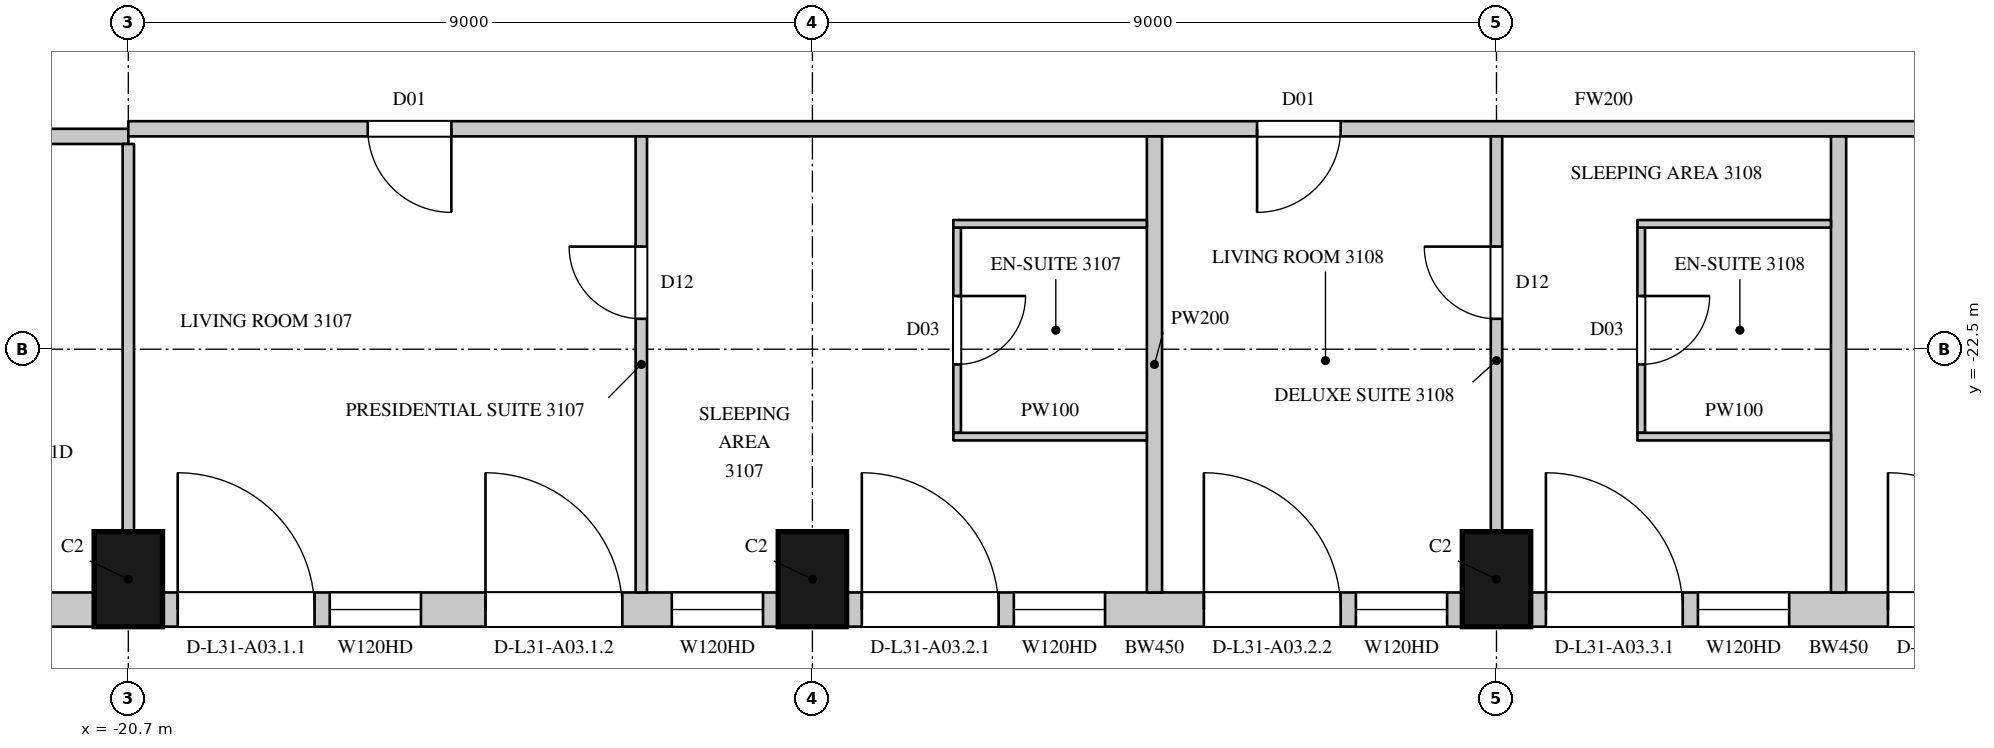
"""IFC4 building model, lengths in metres.
Left out: names, types, materials, properties, quantities, classifications, styles, units other than length and angle.
Written with IfcOpenShell. Run it as: python <this file> out.ifc"""

import sys

from ifc_helpers import new_model, si_unit, direction, frame, frame_2d, origin, origin_2d, place, context, subcontext, project, spatial, rectangle, extrude, element, fill, save


model = new_model("IFC4")
c1 = context("Model", 3, precision=1e-05, world=origin(), true_north=direction((0.0, 1.0)))
c2 = subcontext(c1, "Body", "Model", "MODEL_VIEW")
j1 = project(units=[si_unit("LENGTHUNIT", "METRE"), si_unit("PLANEANGLEUNIT", "RADIAN")], contexts=[c1])
p1 = place(None, origin())
s1 = spatial("IfcSite", under=j1, at=p1, CompositionType="ELEMENT")
p2 = place(p1, origin())
s2 = spatial("IfcBuilding", under=s1, at=p2, CompositionType="ELEMENT")
p3 = place(p2, frame((0.0, 0.0, 141.9)))
s3 = spatial("IfcBuildingStorey", under=s2, at=p3, CompositionType="ELEMENT", Elevation=141.9)
for number, where, z_axis, x_axis in (
    (1, (-20.7, -25.525, 0.0), (0.0, 0.0, 1.0), (1.0, 0.0, 0.0)),
    (2, (-11.7, -25.525, 0.0), (0.0, 0.0, 1.0), (1.0, 0.0, 0.0)),
    (3, (-2.7, -25.525, 0.0), (0.0, 0.0, 1.0), (1.0, 0.0, 0.0)),
):
    element("IfcColumn", number, at=place(p3, frame(where, z_axis=z_axis, x_axis=x_axis)), inside=s3, PredefinedType="COLUMN", context=c2, shape_type="SweptSolid", body=[
        extrude(rectangle(XDim=0.9, YDim=1.25, at=origin_2d()), origin(), (0.0, 0.0, 1.0), 3.6),
    ])
p4 = place(p3, frame((-24.064, -25.925, 0.0), z_axis=(0.0, 0.0, 1.0), x_axis=(1.0, 0.0, 0.0)))
e4 = element("IfcWall", 4, at=p4, inside=s3, PredefinedType="SOLIDWALL", context=c2, shape_type="SweptSolid", body=[
    extrude(rectangle(XDim=2.914, YDim=0.45, at=frame_2d((1.457, 0.0))), origin(), (0.0, 0.0, 1.0), 3.3),
])
p5 = place(p3, frame((-20.25, -25.925, 0.0), z_axis=(0.0, 0.0, 1.0), x_axis=(1.0, 0.0, 0.0)))
e5 = element("IfcWall", 5, at=p5, inside=s3, PredefinedType="SOLIDWALL", context=c2, shape_type="SweptSolid", body=[
    extrude(rectangle(XDim=8.1, YDim=0.45, at=frame_2d((4.05, 0.0))), origin(), (0.0, 0.0, 1.0), 3.3),
])
p6 = place(p5, frame((0.2, 0.0, 0.0)))
e6 = element("IfcOpeningElement", 6, at=p6, cuts=e5, PredefinedType="OPENING", context=c2, shape_type="SweptSolid", body=[
    extrude(rectangle(XDim=1.8, YDim=2.4, at=frame_2d((0.9, 1.2))), frame((0.0, 0.235, 0.0), z_axis=(0.0, -1.0, 0.0), x_axis=(1.0, 0.0, 0.0)), (0.0, 0.0, 1.0), 0.47),
])
p7 = place(p5, frame((2.2, 0.0, 1.05)))
e7 = element("IfcOpeningElement", 7, at=p7, cuts=e5, PredefinedType="OPENING", context=c2, shape_type="SweptSolid", body=[
    extrude(rectangle(XDim=1.2, YDim=2.0, at=frame_2d((0.6, 1.0))), frame((0.0, 0.235, 0.0), z_axis=(0.0, -1.0, 0.0), x_axis=(1.0, 0.0, 0.0)), (0.0, 0.0, 1.0), 0.47),
])
p8 = place(p5, frame((4.249, 0.0, 0.0)))
e8 = element("IfcOpeningElement", 8, at=p8, cuts=e5, PredefinedType="OPENING", context=c2, shape_type="SweptSolid", body=[
    extrude(rectangle(XDim=1.8, YDim=2.4, at=frame_2d((0.9, 1.2))), frame((0.0, 0.235, 0.0), z_axis=(0.0, -1.0, 0.0), x_axis=(1.0, 0.0, 0.0)), (0.0, 0.0, 1.0), 0.47),
])
p9 = place(p5, frame((6.7, 0.0, 1.05)))
e9 = element("IfcOpeningElement", 9, at=p9, cuts=e5, PredefinedType="OPENING", context=c2, shape_type="SweptSolid", body=[
    extrude(rectangle(XDim=1.2, YDim=2.0, at=frame_2d((0.6, 1.0))), frame((0.0, 0.235, 0.0), z_axis=(0.0, -1.0, 0.0), x_axis=(1.0, 0.0, 0.0)), (0.0, 0.0, 1.0), 0.47),
])
p10 = place(p3, frame((-11.25, -25.925, 0.0), z_axis=(0.0, 0.0, 1.0), x_axis=(1.0, 0.0, 0.0)))
e10 = element("IfcWall", 10, at=p10, inside=s3, PredefinedType="SOLIDWALL", context=c2, shape_type="SweptSolid", body=[
    extrude(rectangle(XDim=8.1, YDim=0.45, at=frame_2d((4.05, 0.0))), origin(), (0.0, 0.0, 1.0), 3.3),
])
p11 = place(p10, frame((0.2, 0.0, 0.0)))
e11 = element("IfcOpeningElement", 11, at=p11, cuts=e10, PredefinedType="OPENING", context=c2, shape_type="SweptSolid", body=[
    extrude(rectangle(XDim=1.8, YDim=2.4, at=frame_2d((0.9, 1.2))), frame((0.0, 0.235, 0.0), z_axis=(0.0, -1.0, 0.0), x_axis=(1.0, 0.0, 0.0)), (0.0, 0.0, 1.0), 0.47),
])
p12 = place(p10, frame((2.2, 0.0, 1.05)))
e12 = element("IfcOpeningElement", 12, at=p12, cuts=e10, PredefinedType="OPENING", context=c2, shape_type="SweptSolid", body=[
    extrude(rectangle(XDim=1.2, YDim=2.0, at=frame_2d((0.6, 1.0))), frame((0.0, 0.235, 0.0), z_axis=(0.0, -1.0, 0.0), x_axis=(1.0, 0.0, 0.0)), (0.0, 0.0, 1.0), 0.47),
])
p13 = place(p10, frame((4.7, 0.0, 0.0)))
e13 = element("IfcOpeningElement", 13, at=p13, cuts=e10, PredefinedType="OPENING", context=c2, shape_type="SweptSolid", body=[
    extrude(rectangle(XDim=1.8, YDim=2.4, at=frame_2d((0.9, 1.2))), frame((0.0, 0.235, 0.0), z_axis=(0.0, -1.0, 0.0), x_axis=(1.0, 0.0, 0.0)), (0.0, 0.0, 1.0), 0.47),
])
p14 = place(p10, frame((6.7, 0.0, 1.05)))
e14 = element("IfcOpeningElement", 14, at=p14, cuts=e10, PredefinedType="OPENING", context=c2, shape_type="SweptSolid", body=[
    extrude(rectangle(XDim=1.2, YDim=2.0, at=frame_2d((0.6, 1.0))), frame((0.0, 0.235, 0.0), z_axis=(0.0, -1.0, 0.0), x_axis=(1.0, 0.0, 0.0)), (0.0, 0.0, 1.0), 0.47),
])
p15 = place(p3, frame((-2.25, -25.925, 0.0), z_axis=(0.0, 0.0, 1.0), x_axis=(1.0, 0.0, 0.0)))
e15 = element("IfcWall", 15, at=p15, inside=s3, PredefinedType="SOLIDWALL", context=c2, shape_type="SweptSolid", body=[
    extrude(rectangle(XDim=8.1, YDim=0.45, at=frame_2d((4.05, 0.0))), origin(), (0.0, 0.0, 1.0), 3.3),
])
p16 = place(p15, frame((0.2, 0.0, 0.0)))
e16 = element("IfcOpeningElement", 16, at=p16, cuts=e15, PredefinedType="OPENING", context=c2, shape_type="SweptSolid", body=[
    extrude(rectangle(XDim=1.8, YDim=2.4, at=frame_2d((0.9, 1.2))), frame((0.0, 0.235, 0.0), z_axis=(0.0, -1.0, 0.0), x_axis=(1.0, 0.0, 0.0)), (0.0, 0.0, 1.0), 0.47),
])
p17 = place(p15, frame((2.2, 0.0, 1.05)))
e17 = element("IfcOpeningElement", 17, at=p17, cuts=e15, PredefinedType="OPENING", context=c2, shape_type="SweptSolid", body=[
    extrude(rectangle(XDim=1.2, YDim=2.0, at=frame_2d((0.6, 1.0))), frame((0.0, 0.235, 0.0), z_axis=(0.0, -1.0, 0.0), x_axis=(1.0, 0.0, 0.0)), (0.0, 0.0, 1.0), 0.47),
])
p18 = place(p15, frame((4.7, 0.0, 0.0)))
e18 = element("IfcOpeningElement", 18, at=p18, cuts=e15, PredefinedType="OPENING", context=c2, shape_type="SweptSolid", body=[
    extrude(rectangle(XDim=1.8, YDim=2.4, at=frame_2d((0.9, 1.2))), frame((0.0, 0.235, 0.0), z_axis=(0.0, -1.0, 0.0), x_axis=(1.0, 0.0, 0.0)), (0.0, 0.0, 1.0), 0.47),
])
p19 = place(p15, frame((6.7, 0.0, 1.05)))
e19 = element("IfcOpeningElement", 19, at=p19, cuts=e15, PredefinedType="OPENING", context=c2, shape_type="SweptSolid", body=[
    extrude(rectangle(XDim=1.2, YDim=2.0, at=frame_2d((0.6, 1.0))), frame((0.0, 0.235, 0.0), z_axis=(0.0, -1.0, 0.0), x_axis=(1.0, 0.0, 0.0)), (0.0, 0.0, 1.0), 0.47),
])
p20 = place(p3, frame((-23.752, -19.7, 0.0), z_axis=(0.0, 0.0, 1.0), x_axis=(1.0, 0.0, 0.0)))
e20 = element("IfcWall", 20, at=p20, inside=s3, PredefinedType="PARTITIONING", context=c2, shape_type="SweptSolid", body=[
    extrude(rectangle(XDim=3.052, YDim=0.2, at=frame_2d((1.526, 0.0))), origin(), (0.0, 0.0, 1.0), 3.3),
])
p21 = place(p20, frame((0.85, 0.0, 0.0)))
e21 = element("IfcOpeningElement", 21, at=p21, cuts=e20, PredefinedType="OPENING", context=c2, shape_type="SweptSolid", body=[
    extrude(rectangle(XDim=0.9, YDim=2.2, at=frame_2d((0.45, 1.1))), frame((0.0, 0.11, 0.0), z_axis=(0.0, -1.0, 0.0), x_axis=(1.0, 0.0, 0.0)), (0.0, 0.0, 1.0), 0.22),
])
p22 = place(p3, frame((-20.7, -19.6, 0.0), z_axis=(0.0, 0.0, 1.0), x_axis=(1.0, 0.0, 0.0)))
e22 = element("IfcWall", 22, at=p22, inside=s3, PredefinedType="PARTITIONING", context=c2, shape_type="SweptSolid", body=[
    extrude(rectangle(XDim=38.825, YDim=0.2, at=frame_2d((19.413, 0.0))), origin(), (0.0, 0.0, 1.0), 3.3),
])
p23 = place(p22, frame((3.15, 0.0, 0.0)))
e23 = element("IfcOpeningElement", 23, at=p23, cuts=e22, PredefinedType="OPENING", context=c2, shape_type="SweptSolid", body=[
    extrude(rectangle(XDim=1.1, YDim=2.4, at=frame_2d((0.55, 1.2))), frame((0.0, 0.11, 0.0), z_axis=(0.0, -1.0, 0.0), x_axis=(1.0, 0.0, 0.0)), (0.0, 0.0, 1.0), 0.22),
])
p24 = place(p22, frame((14.85, 0.0, 0.0)))
e24 = element("IfcOpeningElement", 24, at=p24, cuts=e22, PredefinedType="OPENING", context=c2, shape_type="SweptSolid", body=[
    extrude(rectangle(XDim=1.1, YDim=2.4, at=frame_2d((0.55, 1.2))), frame((0.0, 0.11, 0.0), z_axis=(0.0, -1.0, 0.0), x_axis=(1.0, 0.0, 0.0)), (0.0, 0.0, 1.0), 0.22),
])
p25 = place(p22, frame((23.85, 0.0, 0.0)))
e25 = element("IfcOpeningElement", 25, at=p25, cuts=e22, PredefinedType="OPENING", context=c2, shape_type="SweptSolid", body=[
    extrude(rectangle(XDim=1.1, YDim=2.4, at=frame_2d((0.55, 1.2))), frame((0.0, 0.11, 0.0), z_axis=(0.0, -1.0, 0.0), x_axis=(1.0, 0.0, 0.0)), (0.0, 0.0, 1.0), 0.22),
])
p26 = place(p22, frame((37.3, 0.0, 0.0)))
e26 = element("IfcOpeningElement", 26, at=p26, cuts=e22, PredefinedType="OPENING", context=c2, shape_type="SweptSolid", body=[
    extrude(rectangle(XDim=0.95, YDim=2.2, at=frame_2d((0.475, 1.1))), frame((0.0, 0.11, 0.0), z_axis=(0.0, -1.0, 0.0), x_axis=(1.0, 0.0, 0.0)), (0.0, 0.0, 1.0), 0.22),
])
p27 = place(p3, frame((-20.7, -24.9, 0.0), z_axis=(0.0, 0.0, 1.0), x_axis=(0.0, 1.0, 0.0)))
e27 = element("IfcWall", 27, at=p27, inside=s3, PredefinedType="PARTITIONING", context=c2, shape_type="SweptSolid", body=[
    extrude(rectangle(XDim=5.1, YDim=0.15, at=frame_2d((2.55, 0.0))), origin(), (0.0, 0.0, 1.0), 2.75),
])
p28 = place(p3, frame((-13.951, -25.7, 0.0), z_axis=(0.0, 0.0, 1.0), x_axis=(0.0, 1.0, 0.0)))
e28 = element("IfcWall", 28, at=p28, inside=s3, PredefinedType="PARTITIONING", context=c2, shape_type="SweptSolid", body=[
    extrude(rectangle(XDim=6.0, YDim=0.15, at=frame_2d((3.0, 0.0))), origin(), (0.0, 0.0, 1.0), 3.3),
])
p29 = place(p28, frame((3.6, 0.0, 0.0)))
e29 = element("IfcOpeningElement", 29, at=p29, cuts=e28, PredefinedType="OPENING", context=c2, shape_type="SweptSolid", body=[
    extrude(rectangle(XDim=0.95, YDim=2.2, at=frame_2d((0.475, 1.1))), frame((0.0, 0.085, 0.0), z_axis=(0.0, -1.0, 0.0), x_axis=(1.0, 0.0, 0.0)), (0.0, 0.0, 1.0), 0.17),
])
p30 = place(p3, frame((-2.7, -24.9, 0.0), z_axis=(0.0, 0.0, 1.0), x_axis=(0.0, 1.0, 0.0)))
e30 = element("IfcWall", 30, at=p30, inside=s3, PredefinedType="PARTITIONING", context=c2, shape_type="SweptSolid", body=[
    extrude(rectangle(XDim=5.2, YDim=0.15, at=frame_2d((2.6, 0.0))), origin(), (0.0, 0.0, 1.0), 2.75),
])
p31 = place(p30, frame((2.8, 0.0, 0.0)))
e31 = element("IfcOpeningElement", 31, at=p31, cuts=e30, PredefinedType="OPENING", context=c2, shape_type="SweptSolid", body=[
    extrude(rectangle(XDim=0.95, YDim=2.2, at=frame_2d((0.475, 1.1))), frame((0.0, 0.085, 0.0), z_axis=(0.0, -1.0, 0.0), x_axis=(1.0, 0.0, 0.0)), (0.0, 0.0, 1.0), 0.17),
])
for number, where, z_axis, x_axis in (
    (32, (-7.2, -25.7, 0.0), (0.0, 0.0, 1.0), (0.0, 1.0, 0.0)),
    (33, (1.8, -25.7, 0.0), (0.0, 0.0, 1.0), (0.0, 1.0, 0.0)),
):
    element("IfcWall", number, at=place(p3, frame(where, z_axis=z_axis, x_axis=x_axis)), inside=s3, PredefinedType="PARTITIONING", context=c2, shape_type="SweptSolid", body=[
        extrude(rectangle(XDim=6.0, YDim=0.2, at=frame_2d((3.0, 0.0))), origin(), (0.0, 0.0, 1.0), 3.3),
    ])
p32 = place(p3, frame((-9.796, -23.6, 0.0), z_axis=(0.0, 0.0, 1.0), x_axis=(0.0, 1.0, 0.0)))
e34 = element("IfcWall", 34, at=p32, inside=s3, PredefinedType="PARTITIONING", context=c2, shape_type="SweptSolid", body=[
    extrude(rectangle(XDim=2.7, YDim=0.1, at=frame_2d((1.35, 0.0))), origin(), (0.0, 0.0, 1.0), 3.3),
])
p33 = place(p32, frame((0.9, 0.0, 0.0)))
e35 = element("IfcOpeningElement", 35, at=p33, cuts=e34, PredefinedType="OPENING", context=c2, shape_type="SweptSolid", body=[
    extrude(rectangle(XDim=0.9, YDim=2.2, at=frame_2d((0.45, 1.1))), frame((0.0, 0.06, 0.0), z_axis=(0.0, -1.0, 0.0), x_axis=(1.0, 0.0, 0.0)), (0.0, 0.0, 1.0), 0.12),
])
for number, where, z_axis, x_axis in (
    (36, (-9.846, -23.65, 0.0), (0.0, 0.0, 1.0), (1.0, 0.0, 0.0)),
    (37, (-9.846, -20.85, 0.0), (0.0, 0.0, 1.0), (1.0, 0.0, 0.0)),
):
    element("IfcWall", number, at=place(p3, frame(where, z_axis=z_axis, x_axis=x_axis)), inside=s3, PredefinedType="PARTITIONING", context=c2, shape_type="SweptSolid", body=[
        extrude(rectangle(XDim=2.546, YDim=0.1, at=frame_2d((1.273, 0.0))), origin(), (0.0, 0.0, 1.0), 3.3),
    ])
p34 = place(p3, frame((-0.796, -23.6, 0.0), z_axis=(0.0, 0.0, 1.0), x_axis=(0.0, 1.0, 0.0)))
e38 = element("IfcWall", 38, at=p34, inside=s3, PredefinedType="PARTITIONING", context=c2, shape_type="SweptSolid", body=[
    extrude(rectangle(XDim=2.7, YDim=0.1, at=frame_2d((1.35, 0.0))), origin(), (0.0, 0.0, 1.0), 3.3),
])
p35 = place(p34, frame((0.9, 0.0, 0.0)))
e39 = element("IfcOpeningElement", 39, at=p35, cuts=e38, PredefinedType="OPENING", context=c2, shape_type="SweptSolid", body=[
    extrude(rectangle(XDim=0.9, YDim=2.2, at=frame_2d((0.45, 1.1))), frame((0.0, 0.06, 0.0), z_axis=(0.0, -1.0, 0.0), x_axis=(1.0, 0.0, 0.0)), (0.0, 0.0, 1.0), 0.12),
])
for number, where, z_axis, x_axis in (
    (40, (-0.846, -23.65, 0.0), (0.0, 0.0, 1.0), (1.0, 0.0, 0.0)),
    (41, (-0.846, -20.85, 0.0), (0.0, 0.0, 1.0), (1.0, 0.0, 0.0)),
):
    element("IfcWall", number, at=place(p3, frame(where, z_axis=z_axis, x_axis=x_axis)), inside=s3, PredefinedType="PARTITIONING", context=c2, shape_type="SweptSolid", body=[
        extrude(rectangle(XDim=2.546, YDim=0.1, at=frame_2d((1.273, 0.0))), origin(), (0.0, 0.0, 1.0), 3.3),
    ])
p36 = place(p6, origin())
e42 = element("IfcDoor", 42, at=p36, inside=s3, OperationType="SLIDING_TO_LEFT", PredefinedType="DOOR", context=c2, shape_type="SweptSolid", body=[
    extrude(rectangle(XDim=1.8, YDim=2.4, at=frame_2d((0.9, 1.2))), frame((0.0, 0.13, 0.0), z_axis=(0.0, -1.0, 0.0), x_axis=(1.0, 0.0, 0.0)), (0.0, 0.0, 1.0), 0.05),
])
fill(e6, e42)
p37 = place(p7, origin())
e43 = element("IfcWindow", 43, at=p37, inside=s3, PartitioningType="SINGLE_PANEL", PredefinedType="WINDOW", context=c2, shape_type="SweptSolid", body=[
    extrude(rectangle(XDim=1.2, YDim=2.0, at=frame_2d((0.6, 1.0))), frame((0.0, 0.135, 0.0), z_axis=(0.0, -1.0, 0.0), x_axis=(1.0, 0.0, 0.0)), (0.0, 0.0, 1.0), 0.06),
])
fill(e7, e43)
p38 = place(p8, origin())
e44 = element("IfcDoor", 44, at=p38, inside=s3, OperationType="SLIDING_TO_LEFT", PredefinedType="DOOR", context=c2, shape_type="SweptSolid", body=[
    extrude(rectangle(XDim=1.8, YDim=2.4, at=frame_2d((0.9, 1.2))), frame((0.0, 0.13, 0.0), z_axis=(0.0, -1.0, 0.0), x_axis=(1.0, 0.0, 0.0)), (0.0, 0.0, 1.0), 0.05),
])
fill(e8, e44)
p39 = place(p9, origin())
e45 = element("IfcWindow", 45, at=p39, inside=s3, PartitioningType="SINGLE_PANEL", PredefinedType="WINDOW", context=c2, shape_type="SweptSolid", body=[
    extrude(rectangle(XDim=1.2, YDim=2.0, at=frame_2d((0.6, 1.0))), frame((0.0, 0.135, 0.0), z_axis=(0.0, -1.0, 0.0), x_axis=(1.0, 0.0, 0.0)), (0.0, 0.0, 1.0), 0.06),
])
fill(e9, e45)
p40 = place(p11, origin())
e46 = element("IfcDoor", 46, at=p40, inside=s3, OperationType="SLIDING_TO_LEFT", PredefinedType="DOOR", context=c2, shape_type="SweptSolid", body=[
    extrude(rectangle(XDim=1.8, YDim=2.4, at=frame_2d((0.9, 1.2))), frame((0.0, 0.13, 0.0), z_axis=(0.0, -1.0, 0.0), x_axis=(1.0, 0.0, 0.0)), (0.0, 0.0, 1.0), 0.05),
])
fill(e11, e46)
p41 = place(p12, origin())
e47 = element("IfcWindow", 47, at=p41, inside=s3, PartitioningType="SINGLE_PANEL", PredefinedType="WINDOW", context=c2, shape_type="SweptSolid", body=[
    extrude(rectangle(XDim=1.2, YDim=2.0, at=frame_2d((0.6, 1.0))), frame((0.0, 0.135, 0.0), z_axis=(0.0, -1.0, 0.0), x_axis=(1.0, 0.0, 0.0)), (0.0, 0.0, 1.0), 0.06),
])
fill(e12, e47)
p42 = place(p13, origin())
e48 = element("IfcDoor", 48, at=p42, inside=s3, OperationType="SLIDING_TO_LEFT", PredefinedType="DOOR", context=c2, shape_type="SweptSolid", body=[
    extrude(rectangle(XDim=1.8, YDim=2.4, at=frame_2d((0.9, 1.2))), frame((0.0, 0.13, 0.0), z_axis=(0.0, -1.0, 0.0), x_axis=(1.0, 0.0, 0.0)), (0.0, 0.0, 1.0), 0.05),
])
fill(e13, e48)
p43 = place(p14, origin())
e49 = element("IfcWindow", 49, at=p43, inside=s3, PartitioningType="SINGLE_PANEL", PredefinedType="WINDOW", context=c2, shape_type="SweptSolid", body=[
    extrude(rectangle(XDim=1.2, YDim=2.0, at=frame_2d((0.6, 1.0))), frame((0.0, 0.135, 0.0), z_axis=(0.0, -1.0, 0.0), x_axis=(1.0, 0.0, 0.0)), (0.0, 0.0, 1.0), 0.06),
])
fill(e14, e49)
p44 = place(p16, origin())
e50 = element("IfcDoor", 50, at=p44, inside=s3, OperationType="SLIDING_TO_LEFT", PredefinedType="DOOR", context=c2, shape_type="SweptSolid", body=[
    extrude(rectangle(XDim=1.8, YDim=2.4, at=frame_2d((0.9, 1.2))), frame((0.0, 0.13, 0.0), z_axis=(0.0, -1.0, 0.0), x_axis=(1.0, 0.0, 0.0)), (0.0, 0.0, 1.0), 0.05),
])
fill(e16, e50)
p45 = place(p17, origin())
e51 = element("IfcWindow", 51, at=p45, inside=s3, PartitioningType="SINGLE_PANEL", PredefinedType="WINDOW", context=c2, shape_type="SweptSolid", body=[
    extrude(rectangle(XDim=1.2, YDim=2.0, at=frame_2d((0.6, 1.0))), frame((0.0, 0.135, 0.0), z_axis=(0.0, -1.0, 0.0), x_axis=(1.0, 0.0, 0.0)), (0.0, 0.0, 1.0), 0.06),
])
fill(e17, e51)
p46 = place(p18, origin())
e52 = element("IfcDoor", 52, at=p46, inside=s3, OperationType="SLIDING_TO_LEFT", PredefinedType="DOOR", context=c2, shape_type="SweptSolid", body=[
    extrude(rectangle(XDim=1.8, YDim=2.4, at=frame_2d((0.9, 1.2))), frame((0.0, 0.13, 0.0), z_axis=(0.0, -1.0, 0.0), x_axis=(1.0, 0.0, 0.0)), (0.0, 0.0, 1.0), 0.05),
])
fill(e18, e52)
p47 = place(p23, origin())
e53 = element("IfcDoor", 53, at=p47, inside=s3, OperationType="SINGLE_SWING_LEFT", PredefinedType="DOOR", context=c2, shape_type="SweptSolid", body=[
    extrude(rectangle(XDim=1.1, YDim=2.4, at=frame_2d((0.55, 1.2))), frame((0.0, 0.025, 0.0), z_axis=(0.0, -1.0, 0.0), x_axis=(1.0, 0.0, 0.0)), (0.0, 0.0, 1.0), 0.05),
])
fill(e23, e53)
p48 = place(p29, origin())
e54 = element("IfcDoor", 54, at=p48, inside=s3, OperationType="SINGLE_SWING_RIGHT", PredefinedType="DOOR", context=c2, shape_type="SweptSolid", body=[
    extrude(rectangle(XDim=0.95, YDim=2.2, at=frame_2d((0.475, 1.1))), frame((0.0, 0.025, 0.0), z_axis=(0.0, -1.0, 0.0), x_axis=(1.0, 0.0, 0.0)), (0.0, 0.0, 1.0), 0.05),
])
fill(e29, e54)
p49 = place(p33, origin())
e55 = element("IfcDoor", 55, at=p49, inside=s3, OperationType="SINGLE_SWING_LEFT", PredefinedType="DOOR", context=c2, shape_type="SweptSolid", body=[
    extrude(rectangle(XDim=0.9, YDim=2.2, at=frame_2d((0.45, 1.1))), frame((0.0, 0.025, 0.0), z_axis=(0.0, -1.0, 0.0), x_axis=(1.0, 0.0, 0.0)), (0.0, 0.0, 1.0), 0.05),
])
fill(e35, e55)
p50 = place(p24, origin())
e56 = element("IfcDoor", 56, at=p50, inside=s3, OperationType="SINGLE_SWING_RIGHT", PredefinedType="DOOR", context=c2, shape_type="SweptSolid", body=[
    extrude(rectangle(XDim=1.1, YDim=2.4, at=frame_2d((0.55, 1.2))), frame((0.0, 0.025, 0.0), z_axis=(0.0, -1.0, 0.0), x_axis=(1.0, 0.0, 0.0)), (0.0, 0.0, 1.0), 0.05),
])
fill(e24, e56)
p51 = place(p31, origin())
e57 = element("IfcDoor", 57, at=p51, inside=s3, OperationType="SINGLE_SWING_RIGHT", PredefinedType="DOOR", context=c2, shape_type="SweptSolid", body=[
    extrude(rectangle(XDim=0.95, YDim=2.2, at=frame_2d((0.475, 1.1))), frame((0.0, 0.025, 0.0), z_axis=(0.0, -1.0, 0.0), x_axis=(1.0, 0.0, 0.0)), (0.0, 0.0, 1.0), 0.05),
])
fill(e31, e57)
p52 = place(p35, origin())
e58 = element("IfcDoor", 58, at=p52, inside=s3, OperationType="SINGLE_SWING_LEFT", PredefinedType="DOOR", context=c2, shape_type="SweptSolid", body=[
    extrude(rectangle(XDim=0.9, YDim=2.2, at=frame_2d((0.45, 1.1))), frame((0.0, 0.025, 0.0), z_axis=(0.0, -1.0, 0.0), x_axis=(1.0, 0.0, 0.0)), (0.0, 0.0, 1.0), 0.05),
])
fill(e39, e58)
save(model, sys.argv[1])
